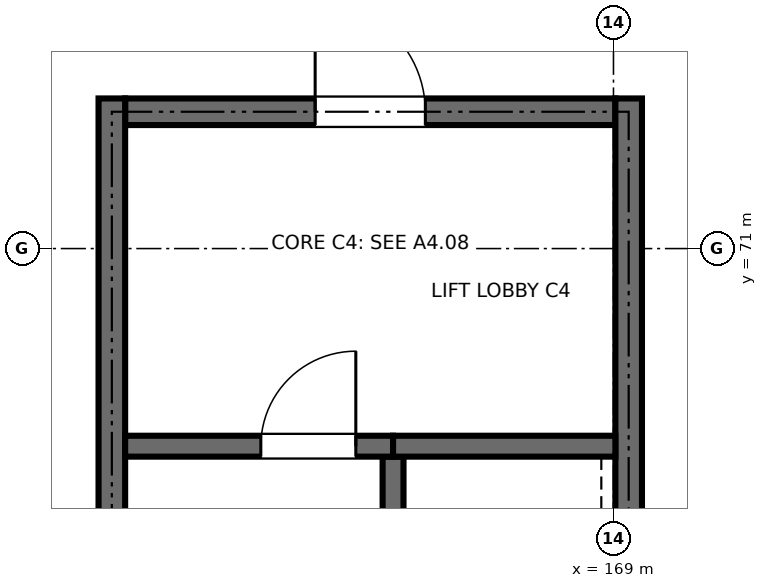
"""IFC4 building model, lengths in metres.
Left out: names, types, materials, properties, quantities, classifications, styles, units other than length and angle.
Written with IfcOpenShell. Run it as: python <this file> out.ifc"""

import sys

from ifc_helpers import new_model, si_unit, direction, frame, frame_2d, origin, place, context, subcontext, project, spatial, rectangle, extrude, element, fill, save


model = new_model("IFC4")
c1 = context("Model", 3, precision=1e-05, world=origin(), true_north=direction((0.0, 1.0)))
c2 = subcontext(c1, "Body", "Model", "MODEL_VIEW")
j1 = project(units=[si_unit("LENGTHUNIT", "METRE"), si_unit("PLANEANGLEUNIT", "RADIAN")], contexts=[c1])
p1 = place(None, origin())
s1 = spatial("IfcSite", under=j1, at=p1, CompositionType="ELEMENT")
p2 = place(p1, origin())
s2 = spatial("IfcBuilding", under=s1, at=p2, CompositionType="ELEMENT")
p3 = place(p2, frame((0.0, 0.0, 18.6)))
s3 = spatial("IfcBuildingStorey", under=s2, at=p3, CompositionType="ELEMENT", Elevation=18.6)
p4 = place(p3, frame((162.575, 72.8, 0.0), z_axis=(0.0, 0.0, 1.0), x_axis=(1.0, 0.0, 0.0)))
e1 = element("IfcWall", 1, at=p4, inside=s3, PredefinedType="SHEAR", context=c2, shape_type="SweptSolid", body=[
    extrude(rectangle(XDim=6.45, YDim=0.35, at=frame_2d((3.225, 0.0))), origin(), (0.0, 0.0, 1.0), 3.98),
])
p5 = place(p4, frame((2.5, 0.0, 0.0)))
e2 = element("IfcOpeningElement", 2, at=p5, cuts=e1, PredefinedType="OPENING", context=c2, shape_type="SweptSolid", body=[
    extrude(rectangle(XDim=1.45, YDim=2.2, at=frame_2d((0.725, 1.1))), frame((0.0, 0.185, 0.0), z_axis=(0.0, -1.0, 0.0), x_axis=(1.0, 0.0, 0.0)), (0.0, 0.0, 1.0), 0.37),
])
for number, where, z_axis, x_axis in (
    (3, (162.4, 61.375, 0.0), (0.0, 0.0, 1.0), (0.0, 1.0, 0.0)),
    (4, (169.2, 61.375, 0.0), (0.0, 0.0, 1.0), (0.0, 1.0, 0.0)),
):
    element("IfcWall", number, at=place(p3, frame(where, z_axis=z_axis, x_axis=x_axis)), inside=s3, PredefinedType="SHEAR", context=c2, shape_type="SweptSolid", body=[
        extrude(rectangle(XDim=11.6, YDim=0.35, at=frame_2d((5.8, 0.0))), origin(), (0.0, 0.0, 1.0), 3.98),
    ])
p6 = place(p3, frame((166.1, 61.375, 0.0), z_axis=(0.0, 0.0, 1.0), x_axis=(0.0, 1.0, 0.0)))
e5 = element("IfcWall", 5, at=p6, inside=s3, PredefinedType="SHEAR", context=c2, shape_type="SweptSolid", body=[
    extrude(rectangle(XDim=6.887, YDim=0.275, at=frame_2d((3.444, 0.0))), origin(), (0.0, 0.0, 1.0), 3.98),
])
p7 = place(p3, frame((162.575, 68.4, 0.0), z_axis=(0.0, 0.0, 1.0), x_axis=(1.0, 0.0, 0.0)))
e6 = element("IfcWall", 6, at=p7, inside=s3, PredefinedType="SHEAR", context=c2, shape_type="SweptSolid", body=[
    extrude(rectangle(XDim=3.525, YDim=0.275, at=frame_2d((1.763, 0.0))), origin(), (0.0, 0.0, 1.0), 3.98),
])
p8 = place(p7, frame((1.785, 0.0, 0.0)))
e7 = element("IfcOpeningElement", 7, at=p8, cuts=e6, PredefinedType="OPENING", context=c2, shape_type="SweptSolid", body=[
    extrude(rectangle(XDim=1.25, YDim=2.15, at=frame_2d((0.625, 1.075))), frame((0.0, 0.147, 0.0), z_axis=(0.0, -1.0, 0.0), x_axis=(1.0, 0.0, 0.0)), (0.0, 0.0, 1.0), 0.295),
])
p9 = place(p3, frame((166.1, 68.4, 0.0), z_axis=(0.0, 0.0, 1.0), x_axis=(1.0, 0.0, 0.0)))
e8 = element("IfcWall", 8, at=p9, inside=s3, PredefinedType="SHEAR", context=c2, shape_type="SweptSolid", body=[
    extrude(rectangle(XDim=2.925, YDim=0.275, at=frame_2d((1.462, 0.0))), origin(), (0.0, 0.0, 1.0), 3.98),
])
p10 = place(p8, origin())
e9 = element("IfcDoor", 9, at=p10, inside=s3, OperationType="SINGLE_SWING_RIGHT", PredefinedType="DOOR", context=c2, shape_type="SweptSolid", body=[
    extrude(rectangle(XDim=1.25, YDim=2.15, at=frame_2d((0.625, 1.075))), frame((0.0, 0.025, 0.0), z_axis=(0.0, -1.0, 0.0), x_axis=(1.0, 0.0, 0.0)), (0.0, 0.0, 1.0), 0.05),
])
fill(e7, e9)
p11 = place(p5, origin())
e10 = element("IfcDoor", 10, at=p11, inside=s3, OperationType="SINGLE_SWING_LEFT", PredefinedType="DOOR", context=c2, shape_type="SweptSolid", body=[
    extrude(rectangle(XDim=1.45, YDim=2.2, at=frame_2d((0.725, 1.1))), frame((0.0, 0.025, 0.0), z_axis=(0.0, -1.0, 0.0), x_axis=(1.0, 0.0, 0.0)), (0.0, 0.0, 1.0), 0.05),
])
fill(e2, e10)
save(model, sys.argv[1])
